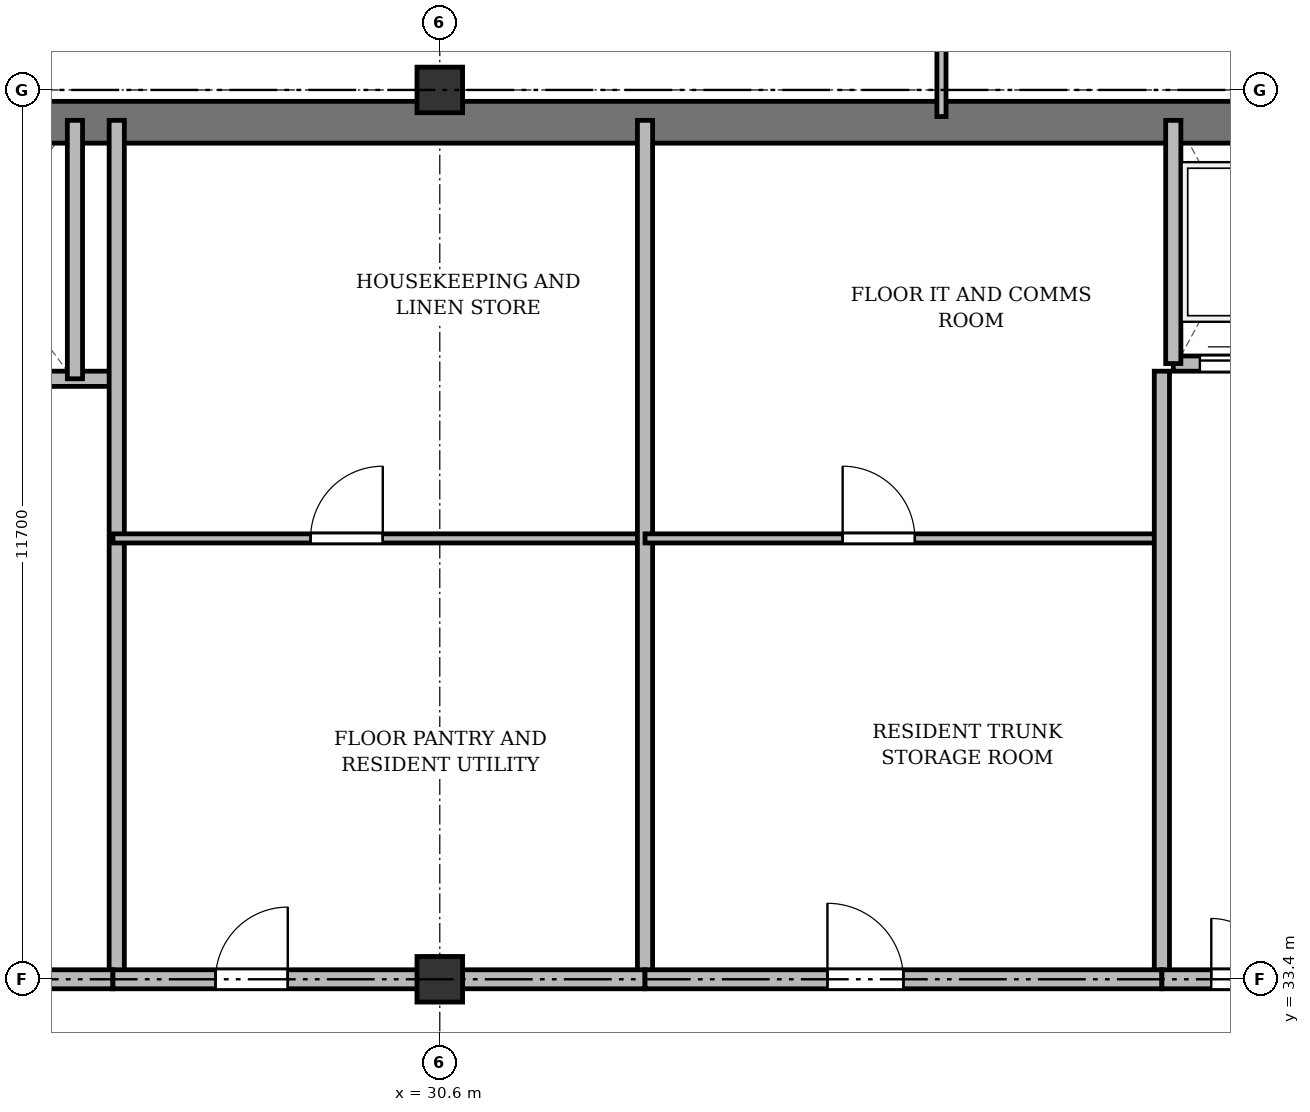
"""IFC4 building model, lengths in metres.
Left out: names, types, materials, properties, quantities, classifications, styles, units other than length and angle.
Written with IfcOpenShell. Run it as: python <this file> out.ifc"""

import sys

from ifc_helpers import new_model, si_unit, direction, frame, frame_2d, origin, origin_2d, place, context, subcontext, project, spatial, rectangle, extrude, source, transform, mapped, element, fill, save


model = new_model("IFC4")
c1 = context("Model", 3, precision=1e-05, world=origin(), true_north=direction((0.0, 1.0)))
c2 = subcontext(c1, "Body", "Model", "MODEL_VIEW")
j1 = project(units=[si_unit("LENGTHUNIT", "METRE"), si_unit("PLANEANGLEUNIT", "RADIAN")], contexts=[c1])
p1 = place(None, origin())
s1 = spatial("IfcSite", under=j1, at=p1, CompositionType="ELEMENT")
p2 = place(p1, origin())
s2 = spatial("IfcBuilding", under=s1, at=p2, CompositionType="ELEMENT")
p3 = place(p2, frame((0.0, 0.0, 263.1)))
s3 = spatial("IfcBuildingStorey", under=s2, at=p3, CompositionType="ELEMENT", Elevation=263.1)
m1 = source(origin(), c2, "Body", "SweptSolid", [
    extrude(rectangle(XDim=0.6, YDim=0.6, at=origin_2d()), origin(), (0.0, 0.0, 1.0), 3.6),
])
for number, where, z_axis, x_axis in (
    (1, (30.6, 33.4, 0.0), (0.0, 0.0, 1.0), (1.0, 0.0, 0.0)),
    (2, (30.6, 45.1, 0.0), (0.0, 0.0, 1.0), (1.0, 0.0, 0.0)),
):
    element("IfcColumn", number, at=place(p3, frame(where, z_axis=z_axis, x_axis=x_axis)), inside=s3, PredefinedType="COLUMN", context=c2, shape_type="MappedRepresentation", body=[
        mapped(m1, transform((0.0, 0.0, 0.0), x_axis=(1.0, 0.0, 0.0), y_axis=(0.0, 1.0, 0.0), z_axis=(0.0, 0.0, 1.0), scale=1.0)),
    ])
p4 = place(p3, frame((15.65, 44.675, 0.0), z_axis=(0.0, 0.0, 1.0), x_axis=(1.0, 0.0, 0.0)))
e3 = element("IfcWall", 3, at=p4, inside=s3, PredefinedType="SHEAR", context=c2, shape_type="SweptSolid", body=[
    extrude(rectangle(XDim=43.1, YDim=0.55, at=frame_2d((21.55, 0.0))), origin(), (0.0, 0.0, 1.0), 3.37),
])
p5 = place(p3, frame((19.55, 41.3, 0.0), z_axis=(0.0, 0.0, 1.0), x_axis=(1.0, 0.0, 0.0)))
e4 = element("IfcWall", 4, at=p5, inside=s3, PredefinedType="SOLIDWALL", context=c2, shape_type="SweptSolid", body=[
    extrude(rectangle(XDim=6.75, YDim=0.2, at=frame_2d((3.375, 0.0))), origin(), (0.0, 0.0, 1.0), 3.37),
])
p6 = place(p5, frame((1.7, 0.0, 0.0)))
e5 = element("IfcOpeningElement", 5, at=p6, cuts=e4, PredefinedType="OPENING", context=c2, shape_type="SweptSolid", body=[
    extrude(rectangle(XDim=1.1, YDim=2.15, at=frame_2d((0.55, 1.075))), frame((0.0, 0.11, 0.0), z_axis=(0.0, -1.0, 0.0), x_axis=(1.0, 0.0, 0.0)), (0.0, 0.0, 1.0), 0.22),
])
p7 = place(p5, frame((4.4, 0.0, 0.0)))
e6 = element("IfcOpeningElement", 6, at=p7, cuts=e4, PredefinedType="OPENING", context=c2, shape_type="SweptSolid", body=[
    extrude(rectangle(XDim=1.1, YDim=2.15, at=frame_2d((0.55, 1.075))), frame((0.0, 0.11, 0.0), z_axis=(0.0, -1.0, 0.0), x_axis=(1.0, 0.0, 0.0)), (0.0, 0.0, 1.0), 0.22),
])
p8 = place(p3, frame((25.8, 41.3, 0.0), z_axis=(0.0, 0.0, 1.0), x_axis=(0.0, 1.0, 0.0)))
e7 = element("IfcWall", 7, at=p8, inside=s3, PredefinedType="SOLIDWALL", context=c2, shape_type="SweptSolid", body=[
    extrude(rectangle(XDim=3.4, YDim=0.2, at=frame_2d((1.7, 0.0))), origin(), (0.0, 0.0, 1.0), 3.37),
])
p9 = place(p3, frame((26.35, 33.4, 0.0), z_axis=(0.0, 0.0, 1.0), x_axis=(0.0, 1.0, 0.0)))
e8 = element("IfcWall", 8, at=p9, inside=s3, PredefinedType="SOLIDWALL", context=c2, shape_type="SweptSolid", body=[
    extrude(rectangle(XDim=11.3, YDim=0.2, at=frame_2d((5.65, 0.0))), origin(), (0.0, 0.0, 1.0), 2.92),
])
p10 = place(p3, frame((19.5, 33.4, 0.0), z_axis=(0.0, 0.0, 1.0), x_axis=(1.0, 0.0, 0.0)))
e9 = element("IfcWall", 9, at=p10, inside=s3, PredefinedType="PARTITIONING", context=c2, shape_type="SweptSolid", body=[
    extrude(rectangle(XDim=6.8, YDim=0.25, at=frame_2d((3.4, 0.0))), origin(), (0.0, 0.0, 1.0), 2.92),
])
p11 = place(p10, frame((0.75, 0.0, 0.0)))
e10 = element("IfcOpeningElement", 10, at=p11, cuts=e9, PredefinedType="OPENING", context=c2, shape_type="SweptSolid", body=[
    extrude(rectangle(XDim=1.6, YDim=2.2, at=frame_2d((0.8, 1.1))), frame((0.0, 0.135, 0.0), z_axis=(0.0, -1.0, 0.0), x_axis=(1.0, 0.0, 0.0)), (0.0, 0.0, 1.0), 0.27),
])
p12 = place(p3, frame((26.3, 39.2, 0.0), z_axis=(0.0, 0.0, 1.0), x_axis=(1.0, 0.0, 0.0)))
e11 = element("IfcWall", 11, at=p12, inside=s3, PredefinedType="PARTITIONING", context=c2, shape_type="SweptSolid", body=[
    extrude(rectangle(XDim=7.0, YDim=0.12, at=frame_2d((3.5, 0.0))), origin(), (0.0, 0.0, 1.0), 2.87),
])
p13 = place(p12, frame((2.6, 0.0, 0.0)))
e12 = element("IfcOpeningElement", 12, at=p13, cuts=e11, PredefinedType="OPENING", context=c2, shape_type="SweptSolid", body=[
    extrude(rectangle(XDim=0.95, YDim=2.15, at=frame_2d((0.475, 1.075))), frame((0.0, 0.07, 0.0), z_axis=(0.0, -1.0, 0.0), x_axis=(1.0, 0.0, 0.0)), (0.0, 0.0, 1.0), 0.14),
])
p14 = place(p3, frame((33.3, 33.4, 0.0), z_axis=(0.0, 0.0, 1.0), x_axis=(0.0, 1.0, 0.0)))
e13 = element("IfcWall", 13, at=p14, inside=s3, PredefinedType="SOLIDWALL", context=c2, shape_type="SweptSolid", body=[
    extrude(rectangle(XDim=11.3, YDim=0.2, at=frame_2d((5.65, 0.0))), origin(), (0.0, 0.0, 1.0), 2.92),
])
p15 = place(p3, frame((33.3, 39.2, 0.0), z_axis=(0.0, 0.0, 1.0), x_axis=(1.0, 0.0, 0.0)))
e14 = element("IfcWall", 14, at=p15, inside=s3, PredefinedType="PARTITIONING", context=c2, shape_type="SweptSolid", body=[
    extrude(rectangle(XDim=6.8, YDim=0.12, at=frame_2d((3.4, 0.0))), origin(), (0.0, 0.0, 1.0), 3.37),
])
p16 = place(p15, frame((2.6, 0.0, 0.0)))
e15 = element("IfcOpeningElement", 15, at=p16, cuts=e14, PredefinedType="OPENING", context=c2, shape_type="SweptSolid", body=[
    extrude(rectangle(XDim=0.95, YDim=2.15, at=frame_2d((0.475, 1.075))), frame((0.0, 0.07, 0.0), z_axis=(0.0, -1.0, 0.0), x_axis=(1.0, 0.0, 0.0)), (0.0, 0.0, 1.0), 0.14),
])
p17 = place(p3, frame((40.1, 33.4, 0.0), z_axis=(0.0, 0.0, 1.0), x_axis=(0.0, 1.0, 0.0)))
e16 = element("IfcWall", 16, at=p17, inside=s3, PredefinedType="SOLIDWALL", context=c2, shape_type="SweptSolid", body=[
    extrude(rectangle(XDim=8.0, YDim=0.2, at=frame_2d((4.0, 0.0))), origin(), (0.0, 0.0, 1.0), 2.92),
])
p18 = place(p3, frame((40.25, 41.5, 0.0), z_axis=(0.0, 0.0, 1.0), x_axis=(1.0, 0.0, 0.0)))
e17 = element("IfcWall", 17, at=p18, inside=s3, PredefinedType="SOLIDWALL", context=c2, shape_type="SweptSolid", body=[
    extrude(rectangle(XDim=6.9, YDim=0.2, at=frame_2d((3.45, 0.0))), origin(), (0.0, 0.0, 1.0), 3.37),
])
p19 = place(p18, frame((0.35, 0.0, 0.0)))
e18 = element("IfcOpeningElement", 18, at=p19, cuts=e17, PredefinedType="OPENING", context=c2, shape_type="SweptSolid", body=[
    extrude(rectangle(XDim=1.05, YDim=2.15, at=frame_2d((0.525, 1.075))), frame((0.0, 0.11, 0.0), z_axis=(0.0, -1.0, 0.0), x_axis=(1.0, 0.0, 0.0)), (0.0, 0.0, 1.0), 0.22),
])
p20 = place(p18, frame((2.05, 0.0, 0.0)))
e19 = element("IfcOpeningElement", 19, at=p20, cuts=e17, PredefinedType="OPENING", context=c2, shape_type="SweptSolid", body=[
    extrude(rectangle(XDim=1.05, YDim=2.15, at=frame_2d((0.525, 1.075))), frame((0.0, 0.11, 0.0), z_axis=(0.0, -1.0, 0.0), x_axis=(1.0, 0.0, 0.0)), (0.0, 0.0, 1.0), 0.22),
])
p21 = place(p18, frame((3.75, 0.0, 0.0)))
e20 = element("IfcOpeningElement", 20, at=p21, cuts=e17, PredefinedType="OPENING", context=c2, shape_type="SweptSolid", body=[
    extrude(rectangle(XDim=1.05, YDim=2.15, at=frame_2d((0.525, 1.075))), frame((0.0, 0.11, 0.0), z_axis=(0.0, -1.0, 0.0), x_axis=(1.0, 0.0, 0.0)), (0.0, 0.0, 1.0), 0.22),
])
p22 = place(p18, frame((5.45, 0.0, 0.0)))
e21 = element("IfcOpeningElement", 21, at=p22, cuts=e17, PredefinedType="OPENING", context=c2, shape_type="SweptSolid", body=[
    extrude(rectangle(XDim=1.05, YDim=2.15, at=frame_2d((0.525, 1.075))), frame((0.0, 0.11, 0.0), z_axis=(0.0, -1.0, 0.0), x_axis=(1.0, 0.0, 0.0)), (0.0, 0.0, 1.0), 0.22),
])
p23 = place(p3, frame((40.25, 41.5, 0.0), z_axis=(0.0, 0.0, 1.0), x_axis=(0.0, 1.0, 0.0)))
e22 = element("IfcWall", 22, at=p23, inside=s3, PredefinedType="SOLIDWALL", context=c2, shape_type="SweptSolid", body=[
    extrude(rectangle(XDim=3.2, YDim=0.2, at=frame_2d((1.6, 0.0))), origin(), (0.0, 0.0, 1.0), 3.37),
])
p24 = place(p3, frame((26.3, 33.4, 0.0), z_axis=(0.0, 0.0, 1.0), x_axis=(1.0, 0.0, 0.0)))
e23 = element("IfcWall", 23, at=p24, inside=s3, PredefinedType="PARTITIONING", context=c2, shape_type="SweptSolid", body=[
    extrude(rectangle(XDim=7.0, YDim=0.25, at=frame_2d((3.5, 0.0))), origin(), (0.0, 0.0, 1.0), 2.92),
])
p25 = place(p24, frame((1.35, 0.0, 0.0)))
e24 = element("IfcOpeningElement", 24, at=p25, cuts=e23, PredefinedType="OPENING", context=c2, shape_type="SweptSolid", body=[
    extrude(rectangle(XDim=0.95, YDim=2.15, at=frame_2d((0.475, 1.075))), frame((0.0, 0.135, 0.0), z_axis=(0.0, -1.0, 0.0), x_axis=(1.0, 0.0, 0.0)), (0.0, 0.0, 1.0), 0.27),
])
p26 = place(p3, frame((33.3, 33.4, 0.0), z_axis=(0.0, 0.0, 1.0), x_axis=(1.0, 0.0, 0.0)))
e25 = element("IfcWall", 25, at=p26, inside=s3, PredefinedType="PARTITIONING", context=c2, shape_type="SweptSolid", body=[
    extrude(rectangle(XDim=6.8, YDim=0.25, at=frame_2d((3.4, 0.0))), origin(), (0.0, 0.0, 1.0), 2.92),
])
p27 = place(p26, frame((2.4, 0.0, 0.0)))
e26 = element("IfcOpeningElement", 26, at=p27, cuts=e25, PredefinedType="OPENING", context=c2, shape_type="SweptSolid", body=[
    extrude(rectangle(XDim=1.0, YDim=2.15, at=frame_2d((0.5, 1.075))), frame((0.0, 0.135, 0.0), z_axis=(0.0, -1.0, 0.0), x_axis=(1.0, 0.0, 0.0)), (0.0, 0.0, 1.0), 0.27),
])
p28 = place(p3, frame((40.1, 33.4, 0.0), z_axis=(0.0, 0.0, 1.0), x_axis=(1.0, 0.0, 0.0)))
e27 = element("IfcWall", 27, at=p28, inside=s3, PredefinedType="PARTITIONING", context=c2, shape_type="SweptSolid", body=[
    extrude(rectangle(XDim=7.05, YDim=0.25, at=frame_2d((3.525, 0.0))), origin(), (0.0, 0.0, 1.0), 2.92),
])
p29 = place(p28, frame((0.65, 0.0, 0.0)))
e28 = element("IfcOpeningElement", 28, at=p29, cuts=e27, PredefinedType="OPENING", context=c2, shape_type="SweptSolid", body=[
    extrude(rectangle(XDim=1.6, YDim=2.2, at=frame_2d((0.8, 1.1))), frame((0.0, 0.135, 0.0), z_axis=(0.0, -1.0, 0.0), x_axis=(1.0, 0.0, 0.0)), (0.0, 0.0, 1.0), 0.27),
])
p30 = place(p3, frame((37.2, 44.75, 0.0), z_axis=(0.0, 0.0, 1.0), x_axis=(0.0, 1.0, 0.0)))
e29 = element("IfcWall", 29, at=p30, inside=s3, PredefinedType="PARTITIONING", context=c2, shape_type="SweptSolid", body=[
    extrude(rectangle(XDim=3.61, YDim=0.12, at=frame_2d((1.805, 0.0))), origin(), (0.0, 0.0, 1.0), 2.92),
])
p31 = place(p30, frame((1.1, 0.0, 0.0)))
e30 = element("IfcOpeningElement", 30, at=p31, cuts=e29, PredefinedType="OPENING", context=c2, shape_type="SweptSolid", body=[
    extrude(rectangle(XDim=0.95, YDim=2.15, at=frame_2d((0.475, 1.075))), frame((0.0, 0.07, 0.0), z_axis=(0.0, -1.0, 0.0), x_axis=(1.0, 0.0, 0.0)), (0.0, 0.0, 1.0), 0.14),
])
m2 = source(origin(), c2, "Body", "SweptSolid", [
    extrude(rectangle(XDim=0.95, YDim=2.15, at=frame_2d((0.475, 1.075))), frame((0.0, 0.025, 0.0), z_axis=(0.0, -1.0, 0.0), x_axis=(1.0, 0.0, 0.0)), (0.0, 0.0, 1.0), 0.05),
])
p32 = place(p13, origin())
e31 = element("IfcDoor", 31, at=p32, inside=s3, OperationType="SINGLE_SWING_RIGHT", PredefinedType="DOOR", context=c2, shape_type="MappedRepresentation", body=[
    mapped(m2, transform((0.0, 0.0, 0.0), x_axis=(1.0, 0.0, 0.0), y_axis=(0.0, 1.0, 0.0), z_axis=(0.0, 0.0, 1.0), scale=1.0)),
])
fill(e12, e31)
p33 = place(p16, origin())
e32 = element("IfcDoor", 32, at=p33, inside=s3, OperationType="SINGLE_SWING_LEFT", PredefinedType="DOOR", context=c2, shape_type="MappedRepresentation", body=[
    mapped(m2, transform((0.0, 0.0, 0.0), x_axis=(1.0, 0.0, 0.0), y_axis=(0.0, 1.0, 0.0), z_axis=(0.0, 0.0, 1.0), scale=1.0)),
])
fill(e15, e32)
m3 = source(origin(), c2, "Body", "SweptSolid", [
    extrude(rectangle(XDim=1.05, YDim=2.15, at=frame_2d((0.525, 1.075))), frame((0.0, 0.025, 0.0), z_axis=(0.0, -1.0, 0.0), x_axis=(1.0, 0.0, 0.0)), (0.0, 0.0, 1.0), 0.05),
])
p34 = place(p19, origin())
e33 = element("IfcDoor", 33, at=p34, inside=s3, OperationType="DOUBLE_DOOR_SLIDING", PredefinedType="DOOR", context=c2, shape_type="MappedRepresentation", body=[
    mapped(m3, transform((0.0, 0.0, 0.0), x_axis=(1.0, 0.0, 0.0), y_axis=(0.0, 1.0, 0.0), z_axis=(0.0, 0.0, 1.0), scale=1.0)),
])
fill(e18, e33)
p35 = place(p25, origin())
e34 = element("IfcDoor", 34, at=p35, inside=s3, OperationType="SINGLE_SWING_RIGHT", PredefinedType="DOOR", context=c2, shape_type="MappedRepresentation", body=[
    mapped(m2, transform((0.0, 0.0, 0.0), x_axis=(1.0, 0.0, 0.0), y_axis=(0.0, 1.0, 0.0), z_axis=(0.0, 0.0, 1.0), scale=1.0)),
])
fill(e24, e34)
m4 = source(origin(), c2, "Body", "SweptSolid", [
    extrude(rectangle(XDim=1.0, YDim=2.15, at=frame_2d((0.5, 1.075))), frame((0.0, 0.025, 0.0), z_axis=(0.0, -1.0, 0.0), x_axis=(1.0, 0.0, 0.0)), (0.0, 0.0, 1.0), 0.05),
])
p36 = place(p27, origin())
e35 = element("IfcDoor", 35, at=p36, inside=s3, OperationType="SINGLE_SWING_LEFT", PredefinedType="DOOR", context=c2, shape_type="MappedRepresentation", body=[
    mapped(m4, transform((0.0, 0.0, 0.0), x_axis=(1.0, 0.0, 0.0), y_axis=(0.0, 1.0, 0.0), z_axis=(0.0, 0.0, 1.0), scale=1.0)),
])
fill(e26, e35)
m5 = source(origin(), c2, "Body", "SweptSolid", [
    extrude(rectangle(XDim=1.6, YDim=2.2, at=frame_2d((0.8, 1.1))), frame((0.0, 0.025, 0.0), z_axis=(0.0, -1.0, 0.0), x_axis=(1.0, 0.0, 0.0)), (0.0, 0.0, 1.0), 0.05),
])
p37 = place(p29, origin())
e36 = element("IfcDoor", 36, at=p37, inside=s3, OperationType="DOUBLE_DOOR_SINGLE_SWING", PredefinedType="DOOR", context=c2, shape_type="MappedRepresentation", body=[
    mapped(m5, transform((0.0, 0.0, 0.0), x_axis=(1.0, 0.0, 0.0), y_axis=(0.0, 1.0, 0.0), z_axis=(0.0, 0.0, 1.0), scale=1.0)),
])
fill(e28, e36)
save(model, sys.argv[1])
